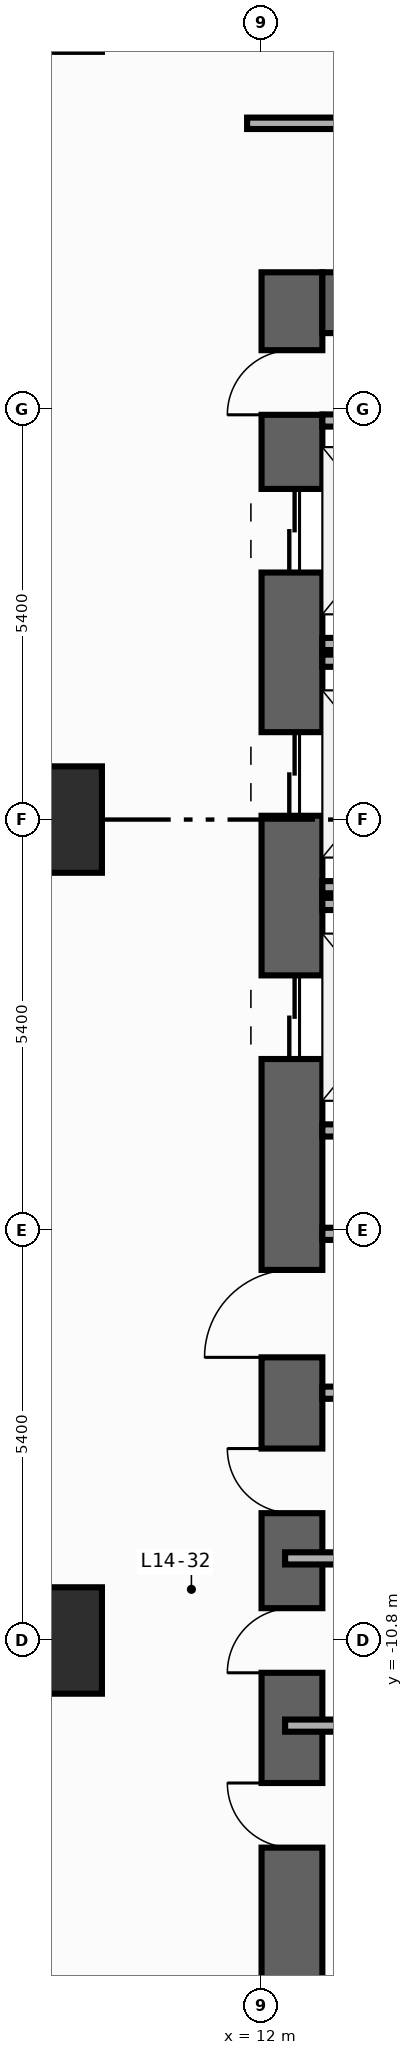
"""IFC4 building model, lengths in metres.
Left out: names, types, materials, properties, quantities, classifications, styles, units other than length and angle.
Written with IfcOpenShell. Run it as: python <this file> out.ifc"""

import sys

from ifc_helpers import new_model, si_unit, direction, frame, frame_2d, origin, origin_2d, place, context, subcontext, project, spatial, rectangle, extrude, element, fill, save


model = new_model("IFC4")
c1 = context("Model", 3, precision=1e-05, world=origin(), true_north=direction((0.0, 1.0)))
c2 = subcontext(c1, "Body", "Model", "MODEL_VIEW")
j1 = project(units=[si_unit("LENGTHUNIT", "METRE"), si_unit("PLANEANGLEUNIT", "RADIAN")], contexts=[c1])
p1 = place(None, origin())
s1 = spatial("IfcSite", under=j1, at=p1, CompositionType="ELEMENT")
p2 = place(p1, origin())
s2 = spatial("IfcBuilding", under=s1, at=p2, CompositionType="ELEMENT")
p3 = place(p2, frame((0.0, 0.0, 59.6)))
s3 = spatial("IfcBuildingStorey", under=s2, at=p3, CompositionType="ELEMENT", Elevation=59.6)
p4 = place(p3, frame((12.4, -19.8, 0.0), z_axis=(0.0, 0.0, 1.0), x_axis=(0.0, 1.0, 0.0)))
e1 = element("IfcWall", 1, at=p4, inside=s3, PredefinedType="SHEAR", context=c2, shape_type="SweptSolid", body=[
    extrude(rectangle(XDim=27.0, YDim=0.8, at=frame_2d((13.5, 0.0))), origin(), (0.0, 0.0, 1.0), 3.94),
])
p5 = place(p4, frame((23.05, 0.0, 0.0)))
e2 = element("IfcOpeningElement", 2, at=p5, cuts=e1, PredefinedType="OPENING", context=c2, shape_type="SweptSolid", body=[
    extrude(rectangle(XDim=1.1, YDim=2.2, at=frame_2d((0.55, 1.1))), frame((0.0, 0.41, 0.0), z_axis=(0.0, -1.0, 0.0), x_axis=(1.0, 0.0, 0.0)), (0.0, 0.0, 1.0), 0.82),
])
p6 = place(p4, frame((19.85, 0.0, 0.0)))
e3 = element("IfcOpeningElement", 3, at=p6, cuts=e1, PredefinedType="OPENING", context=c2, shape_type="SweptSolid", body=[
    extrude(rectangle(XDim=1.1, YDim=2.2, at=frame_2d((0.55, 1.1))), frame((0.0, 0.41, 0.0), z_axis=(0.0, -1.0, 0.0), x_axis=(1.0, 0.0, 0.0)), (0.0, 0.0, 1.0), 0.82),
])
p7 = place(p4, frame((16.65, 0.0, 0.0)))
e4 = element("IfcOpeningElement", 4, at=p7, cuts=e1, PredefinedType="OPENING", context=c2, shape_type="SweptSolid", body=[
    extrude(rectangle(XDim=1.1, YDim=2.2, at=frame_2d((0.55, 1.1))), frame((0.0, 0.41, 0.0), z_axis=(0.0, -1.0, 0.0), x_axis=(1.0, 0.0, 0.0)), (0.0, 0.0, 1.0), 0.82),
])
p8 = place(p4, frame((6.275, 0.0, 0.0)))
e5 = element("IfcOpeningElement", 5, at=p8, cuts=e1, PredefinedType="OPENING", context=c2, shape_type="SweptSolid", body=[
    extrude(rectangle(XDim=0.85, YDim=2.1, at=frame_2d((0.425, 1.05))), frame((0.0, 0.41, 0.0), z_axis=(0.0, -1.0, 0.0), x_axis=(1.0, 0.0, 0.0)), (0.0, 0.0, 1.0), 0.82),
])
p9 = place(p4, frame((8.575, 0.0, 0.0)))
e6 = element("IfcOpeningElement", 6, at=p9, cuts=e1, PredefinedType="OPENING", context=c2, shape_type="SweptSolid", body=[
    extrude(rectangle(XDim=0.85, YDim=2.1, at=frame_2d((0.425, 1.05))), frame((0.0, 0.41, 0.0), z_axis=(0.0, -1.0, 0.0), x_axis=(1.0, 0.0, 0.0)), (0.0, 0.0, 1.0), 0.82),
])
p10 = place(p4, frame((10.675, 0.0, 0.0)))
e7 = element("IfcOpeningElement", 7, at=p10, cuts=e1, PredefinedType="OPENING", context=c2, shape_type="SweptSolid", body=[
    extrude(rectangle(XDim=0.85, YDim=2.1, at=frame_2d((0.425, 1.05))), frame((0.0, 0.41, 0.0), z_axis=(0.0, -1.0, 0.0), x_axis=(1.0, 0.0, 0.0)), (0.0, 0.0, 1.0), 0.82),
])
p11 = place(p4, frame((12.725, 0.0, 0.0)))
e8 = element("IfcOpeningElement", 8, at=p11, cuts=e1, PredefinedType="OPENING", context=c2, shape_type="SweptSolid", body=[
    extrude(rectangle(XDim=1.15, YDim=2.2, at=frame_2d((0.575, 1.1))), frame((0.0, 0.41, 0.0), z_axis=(0.0, -1.0, 0.0), x_axis=(1.0, 0.0, 0.0)), (0.0, 0.0, 1.0), 0.82),
])
p12 = place(p4, frame((25.125, 0.0, 0.0)))
e9 = element("IfcOpeningElement", 9, at=p12, cuts=e1, PredefinedType="OPENING", context=c2, shape_type="SweptSolid", body=[
    extrude(rectangle(XDim=0.85, YDim=2.1, at=frame_2d((0.425, 1.05))), frame((0.0, 0.41, 0.0), z_axis=(0.0, -1.0, 0.0), x_axis=(1.0, 0.0, 0.0)), (0.0, 0.0, 1.0), 0.82),
])
p13 = place(p3, frame((12.8, 6.8, 0.0), z_axis=(0.0, 0.0, 1.0), x_axis=(1.0, 0.0, 0.0)))
e10 = element("IfcWall", 10, at=p13, inside=s3, PredefinedType="SHEAR", context=c2, shape_type="SweptSolid", body=[
    extrude(rectangle(XDim=6.8, YDim=0.8, at=frame_2d((3.4, 0.0))), origin(), (0.0, 0.0, 1.0), 3.94),
])
for number, where, z_axis, x_axis in (
    (11, (9.2, -10.8, 0.0), (0.0, 0.0, 1.0), (1.0, 0.0, 0.0)),
    (12, (9.2, 0.0, 0.0), (0.0, 0.0, 1.0), (1.0, 0.0, 0.0)),
):
    element("IfcColumn", number, at=place(p3, frame(where, z_axis=z_axis, x_axis=x_axis)), inside=s3, PredefinedType="COLUMN", context=c2, shape_type="SweptSolid", body=[
        extrude(rectangle(XDim=1.4, YDim=1.4, at=origin_2d()), origin(), (0.0, 0.0, 1.0), 4.2),
    ])
for number, where, z_axis, x_axis in (
    (13, (12.8, 2.31, 0.0), (0.0, 0.0, 1.0), (1.0, 0.0, 0.0)),
    (14, (12.8, -0.89, 0.0), (0.0, 0.0, 1.0), (1.0, 0.0, 0.0)),
    (15, (12.8, 2.09, 0.0), (0.0, 0.0, 1.0), (1.0, 0.0, 0.0)),
    (16, (12.8, -4.09, 0.0), (0.0, 0.0, 1.0), (1.0, 0.0, 0.0)),
    (17, (12.8, -1.11, 0.0), (0.0, 0.0, 1.0), (1.0, 0.0, 0.0)),
):
    element("IfcWall", number, at=place(p3, frame(where, z_axis=z_axis, x_axis=x_axis)), inside=s3, PredefinedType="STANDARD", context=c2, shape_type="SweptSolid", body=[
        extrude(rectangle(XDim=2.19, YDim=0.16, at=frame_2d((1.095, 0.0))), origin(), (0.0, 0.0, 1.0), 3.94),
    ])
for number, where, z_axis, x_axis in (
    (18, (12.8, -5.45, 0.0), (0.0, 0.0, 1.0), (1.0, 0.0, 0.0)),
    (19, (12.8, -7.54, 0.0), (0.0, 0.0, 1.0), (1.0, 0.0, 0.0)),
    (20, (12.8, 5.25, 0.0), (0.0, 0.0, 1.0), (1.0, 0.0, 0.0)),
):
    element("IfcWall", number, at=place(p3, frame(where, z_axis=z_axis, x_axis=x_axis)), inside=s3, PredefinedType="STANDARD", context=c2, shape_type="SweptSolid", body=[
        extrude(rectangle(XDim=2.6, YDim=0.16, at=frame_2d((1.3, 0.0))), origin(), (0.0, 0.0, 1.0), 3.94),
    ])
for number, where, z_axis, x_axis in (
    (21, (12.31, -11.92, 0.0), (0.0, 0.0, 1.0), (1.0, 0.0, 0.0)),
    (22, (12.31, -9.72, 0.0), (0.0, 0.0, 1.0), (1.0, 0.0, 0.0)),
):
    element("IfcWall", number, at=place(p3, frame(where, z_axis=z_axis, x_axis=x_axis)), inside=s3, PredefinedType="PARTITIONING", context=c2, shape_type="SweptSolid", body=[
        extrude(rectangle(XDim=3.065, YDim=0.16, at=frame_2d((1.532, 0.0))), origin(), (0.0, 0.0, 1.0), 3.94),
    ])
p14 = place(p3, frame((11.81, 9.16, 0.0), z_axis=(0.0, 0.0, 1.0), x_axis=(1.0, 0.0, 0.0)))
e23 = element("IfcWall", 23, at=p14, inside=s3, PredefinedType="PARTITIONING", context=c2, shape_type="SweptSolid", body=[
    extrude(rectangle(XDim=8.83, YDim=0.15, at=frame_2d((4.415, 0.0))), origin(), (0.0, 0.0, 1.0), 3.94),
])
p15 = place(p14, frame((5.067, 0.0, 0.0)))
e24 = element("IfcOpeningElement", 24, at=p15, cuts=e23, PredefinedType="OPENING", context=c2, shape_type="SweptSolid", body=[
    extrude(rectangle(XDim=0.9, YDim=2.15, at=frame_2d((0.45, 1.075))), frame((0.0, 0.085, 0.0), z_axis=(0.0, -1.0, 0.0), x_axis=(1.0, 0.0, 0.0)), (0.0, 0.0, 1.0), 0.17),
])
p16 = place(p5, origin())
e25 = element("IfcDoor", 25, at=p16, inside=s3, OperationType="DOUBLE_DOOR_SLIDING", PredefinedType="DOOR", context=c2, shape_type="SweptSolid", body=[
    extrude(rectangle(XDim=1.1, YDim=2.2, at=frame_2d((0.55, 1.1))), frame((0.0, 0.025, 0.0), z_axis=(0.0, -1.0, 0.0), x_axis=(1.0, 0.0, 0.0)), (0.0, 0.0, 1.0), 0.05),
])
fill(e2, e25)
p17 = place(p6, origin())
e26 = element("IfcDoor", 26, at=p17, inside=s3, OperationType="DOUBLE_DOOR_SLIDING", PredefinedType="DOOR", context=c2, shape_type="SweptSolid", body=[
    extrude(rectangle(XDim=1.1, YDim=2.2, at=frame_2d((0.55, 1.1))), frame((0.0, 0.025, 0.0), z_axis=(0.0, -1.0, 0.0), x_axis=(1.0, 0.0, 0.0)), (0.0, 0.0, 1.0), 0.05),
])
fill(e3, e26)
p18 = place(p7, origin())
e27 = element("IfcDoor", 27, at=p18, inside=s3, OperationType="DOUBLE_DOOR_SLIDING", PredefinedType="DOOR", context=c2, shape_type="SweptSolid", body=[
    extrude(rectangle(XDim=1.1, YDim=2.2, at=frame_2d((0.55, 1.1))), frame((0.0, 0.025, 0.0), z_axis=(0.0, -1.0, 0.0), x_axis=(1.0, 0.0, 0.0)), (0.0, 0.0, 1.0), 0.05),
])
fill(e4, e27)
p19 = place(p8, origin())
e28 = element("IfcDoor", 28, at=p19, inside=s3, OperationType="SINGLE_SWING_RIGHT", PredefinedType="DOOR", context=c2, shape_type="SweptSolid", body=[
    extrude(rectangle(XDim=0.85, YDim=2.1, at=frame_2d((0.425, 1.05))), frame((0.0, 0.025, 0.0), z_axis=(0.0, -1.0, 0.0), x_axis=(1.0, 0.0, 0.0)), (0.0, 0.0, 1.0), 0.05),
])
fill(e5, e28)
p20 = place(p9, origin())
e29 = element("IfcDoor", 29, at=p20, inside=s3, OperationType="SINGLE_SWING_LEFT", PredefinedType="DOOR", context=c2, shape_type="SweptSolid", body=[
    extrude(rectangle(XDim=0.85, YDim=2.1, at=frame_2d((0.425, 1.05))), frame((0.0, 0.025, 0.0), z_axis=(0.0, -1.0, 0.0), x_axis=(1.0, 0.0, 0.0)), (0.0, 0.0, 1.0), 0.05),
])
fill(e6, e29)
p21 = place(p10, origin())
e30 = element("IfcDoor", 30, at=p21, inside=s3, OperationType="SINGLE_SWING_RIGHT", PredefinedType="DOOR", context=c2, shape_type="SweptSolid", body=[
    extrude(rectangle(XDim=0.85, YDim=2.1, at=frame_2d((0.425, 1.05))), frame((0.0, 0.025, 0.0), z_axis=(0.0, -1.0, 0.0), x_axis=(1.0, 0.0, 0.0)), (0.0, 0.0, 1.0), 0.05),
])
fill(e7, e30)
p22 = place(p11, origin())
e31 = element("IfcDoor", 31, at=p22, inside=s3, OperationType="SINGLE_SWING_LEFT", PredefinedType="DOOR", context=c2, shape_type="SweptSolid", body=[
    extrude(rectangle(XDim=1.15, YDim=2.2, at=frame_2d((0.575, 1.1))), frame((0.0, 0.025, 0.0), z_axis=(0.0, -1.0, 0.0), x_axis=(1.0, 0.0, 0.0)), (0.0, 0.0, 1.0), 0.05),
])
fill(e8, e31)
p23 = place(p12, origin())
e32 = element("IfcDoor", 32, at=p23, inside=s3, OperationType="SINGLE_SWING_LEFT", PredefinedType="DOOR", context=c2, shape_type="SweptSolid", body=[
    extrude(rectangle(XDim=0.85, YDim=2.1, at=frame_2d((0.425, 1.05))), frame((0.0, 0.025, 0.0), z_axis=(0.0, -1.0, 0.0), x_axis=(1.0, 0.0, 0.0)), (0.0, 0.0, 1.0), 0.05),
])
fill(e9, e32)
save(model, sys.argv[1])
